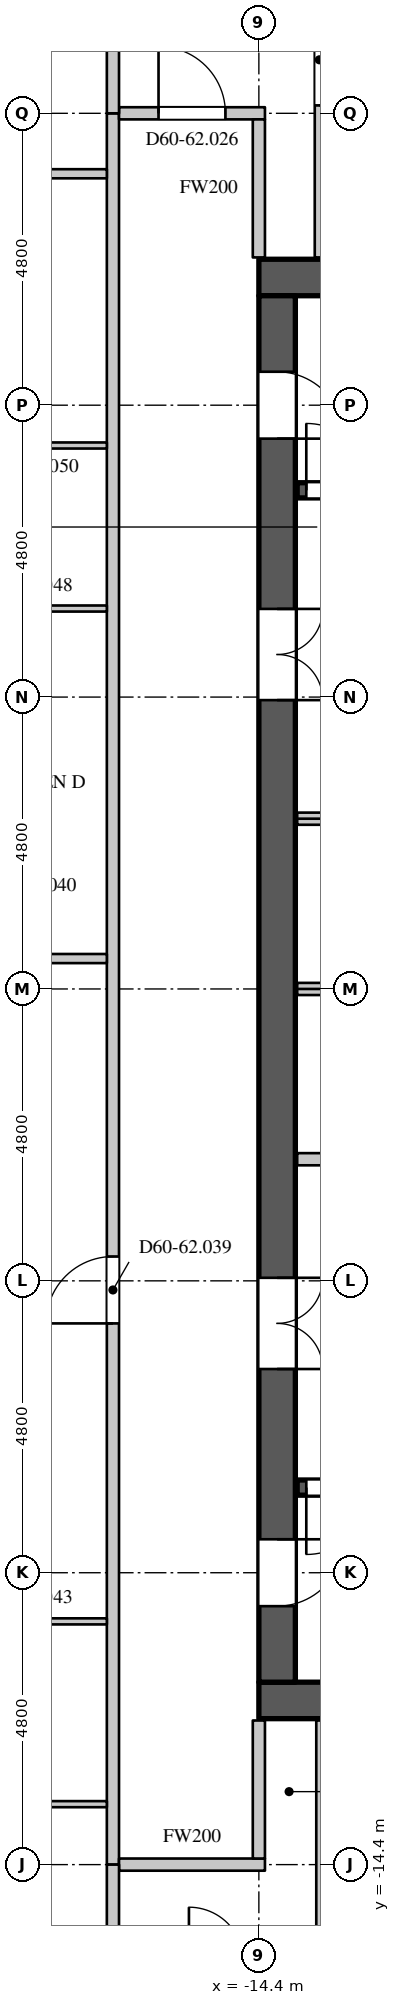
"""IFC4 building model, lengths in metres.
Left out: names, types, materials, properties, quantities, classifications, styles, units other than length and angle.
Written with IfcOpenShell. Run it as: python <this file> out.ifc"""

import sys

from ifc_helpers import new_model, si_unit, direction, frame, frame_2d, origin, place, context, subcontext, project, spatial, rectangle, extrude, element, fill, save


model = new_model("IFC4")
c1 = context("Model", 3, precision=1e-05, world=origin(), true_north=direction((0.0, 1.0)))
c2 = subcontext(c1, "Body", "Model", "MODEL_VIEW")
j1 = project(units=[si_unit("LENGTHUNIT", "METRE"), si_unit("PLANEANGLEUNIT", "RADIAN")], contexts=[c1])
p1 = place(None, origin())
s1 = spatial("IfcSite", under=j1, at=p1, CompositionType="ELEMENT")
p2 = place(p1, origin())
s2 = spatial("IfcBuilding", under=s1, at=p2, CompositionType="ELEMENT")
p3 = place(p2, frame((0.0, 0.0, 260.1)))
s3 = spatial("IfcBuildingStorey", under=s2, at=p3, CompositionType="ELEMENT", Elevation=260.1)
for number, where, z_axis, x_axis in (
    (1, (-14.4, 11.7, 0.0), (0.0, 0.0, 1.0), (1.0, 0.0, 0.0)),
    (2, (-14.4, -11.7, 0.0), (0.0, 0.0, 1.0), (1.0, 0.0, 0.0)),
):
    element("IfcWall", number, at=place(p3, frame(where, z_axis=z_axis, x_axis=x_axis)), inside=s3, PredefinedType="SHEAR", context=c2, shape_type="SweptSolid", body=[
        extrude(rectangle(XDim=28.8, YDim=0.6, at=frame_2d((14.4, 0.0))), origin(), (0.0, 0.0, 1.0), 4.2),
    ])
p4 = place(p3, frame((-14.1, -11.4, 0.0), z_axis=(0.0, 0.0, 1.0), x_axis=(0.0, 1.0, 0.0)))
e3 = element("IfcWall", 3, at=p4, inside=s3, PredefinedType="SHEAR", context=c2, shape_type="SweptSolid", body=[
    extrude(rectangle(XDim=22.8, YDim=0.6, at=frame_2d((11.4, 0.0))), origin(), (0.0, 0.0, 1.0), 4.2),
])
p5 = place(p4, frame((20.45, 0.0, 0.0)))
e4 = element("IfcOpeningElement", 4, at=p5, cuts=e3, PredefinedType="OPENING", context=c2, shape_type="SweptSolid", body=[
    extrude(rectangle(XDim=1.1, YDim=2.2, at=frame_2d((0.55, 1.1))), frame((0.0, 0.31, 0.0), z_axis=(0.0, -1.0, 0.0), x_axis=(1.0, 0.0, 0.0)), (0.0, 0.0, 1.0), 0.62),
])
p6 = place(p4, frame((1.25, 0.0, 0.0)))
e5 = element("IfcOpeningElement", 5, at=p6, cuts=e3, PredefinedType="OPENING", context=c2, shape_type="SweptSolid", body=[
    extrude(rectangle(XDim=1.1, YDim=2.2, at=frame_2d((0.55, 1.1))), frame((0.0, 0.31, 0.0), z_axis=(0.0, -1.0, 0.0), x_axis=(1.0, 0.0, 0.0)), (0.0, 0.0, 1.0), 0.62),
])
p7 = place(p4, frame((16.15, 0.0, 0.0)))
e6 = element("IfcOpeningElement", 6, at=p7, cuts=e3, PredefinedType="OPENING", context=c2, shape_type="SweptSolid", body=[
    extrude(rectangle(XDim=1.5, YDim=2.4, at=frame_2d((0.75, 1.2))), frame((0.0, 0.31, 0.0), z_axis=(0.0, -1.0, 0.0), x_axis=(1.0, 0.0, 0.0)), (0.0, 0.0, 1.0), 0.62),
])
p8 = place(p4, frame((5.15, 0.0, 0.0)))
e7 = element("IfcOpeningElement", 7, at=p8, cuts=e3, PredefinedType="OPENING", context=c2, shape_type="SweptSolid", body=[
    extrude(rectangle(XDim=1.5, YDim=2.4, at=frame_2d((0.75, 1.2))), frame((0.0, 0.31, 0.0), z_axis=(0.0, -1.0, 0.0), x_axis=(1.0, 0.0, 0.0)), (0.0, 0.0, 1.0), 0.62),
])
p9 = place(p3, frame((-16.8, -14.4, 0.0), z_axis=(0.0, 0.0, 1.0), x_axis=(0.0, 1.0, 0.0)))
e8 = element("IfcWall", 8, at=p9, inside=s3, PredefinedType="PARTITIONING", context=c2, shape_type="SweptSolid", body=[
    extrude(rectangle(XDim=28.8, YDim=0.2, at=frame_2d((14.4, 0.0))), origin(), (0.0, 0.0, 1.0), 3.95),
])
p10 = place(p9, frame((8.9, 0.0, 0.0)))
e9 = element("IfcOpeningElement", 9, at=p10, cuts=e8, PredefinedType="OPENING", context=c2, shape_type="SweptSolid", body=[
    extrude(rectangle(XDim=1.1, YDim=2.4, at=frame_2d((0.55, 1.2))), frame((0.0, 0.11, 0.0), z_axis=(0.0, -1.0, 0.0), x_axis=(1.0, 0.0, 0.0)), (0.0, 0.0, 1.0), 0.22),
])
p11 = place(p3, frame((-16.7, -14.4, 0.0), z_axis=(0.0, 0.0, 1.0), x_axis=(1.0, 0.0, 0.0)))
e10 = element("IfcWall", 10, at=p11, inside=s3, PredefinedType="PARTITIONING", context=c2, shape_type="SweptSolid", body=[
    extrude(rectangle(XDim=2.4, YDim=0.2, at=frame_2d((1.2, 0.0))), origin(), (0.0, 0.0, 1.0), 3.95),
])
p12 = place(p3, frame((-16.7, 14.4, 0.0), z_axis=(0.0, 0.0, 1.0), x_axis=(1.0, 0.0, 0.0)))
e11 = element("IfcWall", 11, at=p12, inside=s3, PredefinedType="PARTITIONING", context=c2, shape_type="SweptSolid", body=[
    extrude(rectangle(XDim=2.4, YDim=0.2, at=frame_2d((1.2, 0.0))), origin(), (0.0, 0.0, 1.0), 3.95),
])
p13 = place(p12, frame((0.65, 0.0, 0.0)))
e12 = element("IfcOpeningElement", 12, at=p13, cuts=e11, PredefinedType="OPENING", context=c2, shape_type="SweptSolid", body=[
    extrude(rectangle(XDim=1.1, YDim=2.4, at=frame_2d((0.55, 1.2))), frame((0.0, 0.11, 0.0), z_axis=(0.0, -1.0, 0.0), x_axis=(1.0, 0.0, 0.0)), (0.0, 0.0, 1.0), 0.22),
])
for number, where, z_axis, x_axis in (
    (13, (-14.4, -14.3, 0.0), (0.0, 0.0, 1.0), (0.0, 1.0, 0.0)),
    (14, (-14.4, 12.03, 0.0), (0.0, 0.0, 1.0), (0.0, 1.0, 0.0)),
):
    element("IfcWall", number, at=place(p3, frame(where, z_axis=z_axis, x_axis=x_axis)), inside=s3, PredefinedType="PARTITIONING", context=c2, shape_type="SweptSolid", body=[
        extrude(rectangle(XDim=2.27, YDim=0.2, at=frame_2d((1.135, 0.0))), origin(), (0.0, 0.0, 1.0), 3.95),
    ])
p14 = place(p3, frame((-25.224, 13.406, 0.0), z_axis=(0.0, 0.0, 1.0), x_axis=(1.0, 0.0, 0.0)))
e15 = element("IfcWall", 15, at=p14, inside=s3, PredefinedType="PARTITIONING", context=c2, shape_type="SweptSolid", body=[
    extrude(rectangle(XDim=8.324, YDim=0.15, at=frame_2d((4.162, 0.0))), origin(), (0.0, 0.0, 1.0), 3.95),
])
p15 = place(p14, frame((1.693, 0.0, 0.0)))
e16 = element("IfcOpeningElement", 16, at=p15, cuts=e15, PredefinedType="OPENING", context=c2, shape_type="SweptSolid", body=[
    extrude(rectangle(XDim=1.5, YDim=2.2, at=frame_2d((0.75, 1.1))), frame((0.0, 0.085, 0.0), z_axis=(0.0, -1.0, 0.0), x_axis=(1.0, 0.0, 0.0)), (0.0, 0.0, 1.0), 0.17),
])
p16 = place(p3, frame((-20.825, 0.5, 0.0), z_axis=(0.0, 0.0, 1.0), x_axis=(1.0, 0.0, 0.0)))
e17 = element("IfcWall", 17, at=p16, inside=s3, PredefinedType="PARTITIONING", context=c2, shape_type="SweptSolid", body=[
    extrude(rectangle(XDim=3.925, YDim=0.15, at=frame_2d((1.962, 0.0))), origin(), (0.0, 0.0, 1.0), 3.95),
])
p17 = place(p16, frame((1.5, 0.0, 0.0)))
e18 = element("IfcOpeningElement", 18, at=p17, cuts=e17, PredefinedType="OPENING", context=c2, shape_type="SweptSolid", body=[
    extrude(rectangle(XDim=0.95, YDim=2.2, at=frame_2d((0.475, 1.1))), frame((0.0, 0.085, 0.0), z_axis=(0.0, -1.0, 0.0), x_axis=(1.0, 0.0, 0.0)), (0.0, 0.0, 1.0), 0.17),
])
p18 = place(p3, frame((-13.406, 12.03, 0.0), z_axis=(0.0, 0.0, 1.0), x_axis=(0.0, 1.0, 0.0)))
e19 = element("IfcWall", 19, at=p18, inside=s3, PredefinedType="PARTITIONING", context=c2, shape_type="SweptSolid", body=[
    extrude(rectangle(XDim=13.701, YDim=0.15, at=frame_2d((6.851, 0.0))), origin(), (0.0, 0.0, 1.0), 3.3),
])
p19 = place(p18, frame((2.5, 0.0, 0.0)))
e20 = element("IfcOpeningElement", 20, at=p19, cuts=e19, PredefinedType="OPENING", context=c2, shape_type="SweptSolid", body=[
    extrude(rectangle(XDim=1.5, YDim=2.2, at=frame_2d((0.75, 1.1))), frame((0.0, 0.085, 0.0), z_axis=(0.0, -1.0, 0.0), x_axis=(1.0, 0.0, 0.0)), (0.0, 0.0, 1.0), 0.17),
])
for number, where, z_axis, x_axis in (
    (21, (-16.8, -19.803, 0.0), (0.0, 0.0, 1.0), (0.0, 1.0, 0.0)),
    (22, (-16.8, 14.4, 0.0), (0.0, 0.0, 1.0), (0.0, 1.0, 0.0)),
):
    element("IfcWall", number, at=place(p3, frame(where, z_axis=z_axis, x_axis=x_axis)), inside=s3, PredefinedType="PARTITIONING", context=c2, shape_type="SweptSolid", body=[
        extrude(rectangle(XDim=5.403, YDim=0.2, at=frame_2d((2.702, 0.0))), origin(), (0.0, 0.0, 1.0), 3.95),
    ])
p20 = place(p3, frame((-13.77, -2.8, 0.0), z_axis=(0.0, 0.0, 1.0), x_axis=(1.0, 0.0, 0.0)))
e23 = element("IfcWall", 23, at=p20, inside=s3, PredefinedType="PARTITIONING", context=c2, shape_type="SweptSolid", body=[
    extrude(rectangle(XDim=3.37, YDim=0.2, at=frame_2d((1.685, 0.0))), origin(), (0.0, 0.0, 1.0), 3.95),
])
p21 = place(p20, frame((1.35, 0.0, 0.0)))
e24 = element("IfcOpeningElement", 24, at=p21, cuts=e23, PredefinedType="OPENING", context=c2, shape_type="SweptSolid", body=[
    extrude(rectangle(XDim=0.6, YDim=2.0, at=frame_2d((0.3, 1.0))), frame((0.0, 0.11, 0.0), z_axis=(0.0, -1.0, 0.0), x_axis=(1.0, 0.0, 0.0)), (0.0, 0.0, 1.0), 0.22),
])
p22 = place(p3, frame((-13.77, 0.0, 0.0), z_axis=(0.0, 0.0, 1.0), x_axis=(1.0, 0.0, 0.0)))
e25 = element("IfcWall", 25, at=p22, inside=s3, PredefinedType="PARTITIONING", context=c2, shape_type="SweptSolid", body=[
    extrude(rectangle(XDim=21.57, YDim=0.2, at=frame_2d((10.785, 0.0))), origin(), (0.0, 0.0, 1.0), 3.95),
])
p23 = place(p3, frame((-13.77, 2.8, 0.0), z_axis=(0.0, 0.0, 1.0), x_axis=(1.0, 0.0, 0.0)))
e26 = element("IfcWall", 26, at=p23, inside=s3, PredefinedType="PARTITIONING", context=c2, shape_type="SweptSolid", body=[
    extrude(rectangle(XDim=5.95, YDim=0.2, at=frame_2d((2.975, 0.0))), origin(), (0.0, 0.0, 1.0), 3.95),
])
p24 = place(p23, frame((1.1, 0.0, 0.0)))
e27 = element("IfcOpeningElement", 27, at=p24, cuts=e26, PredefinedType="OPENING", context=c2, shape_type="SweptSolid", body=[
    extrude(rectangle(XDim=1.1, YDim=2.2, at=frame_2d((0.55, 1.1))), frame((0.0, 0.11, 0.0), z_axis=(0.0, -1.0, 0.0), x_axis=(1.0, 0.0, 0.0)), (0.0, 0.0, 1.0), 0.22),
])
p25 = place(p23, frame((4.1, 0.0, 0.0)))
e28 = element("IfcOpeningElement", 28, at=p25, cuts=e26, PredefinedType="OPENING", context=c2, shape_type="SweptSolid", body=[
    extrude(rectangle(XDim=1.1, YDim=2.2, at=frame_2d((0.55, 1.1))), frame((0.0, 0.11, 0.0), z_axis=(0.0, -1.0, 0.0), x_axis=(1.0, 0.0, 0.0)), (0.0, 0.0, 1.0), 0.22),
])
p26 = place(p3, frame((-13.77, -8.2, 0.0), z_axis=(0.0, 0.0, 1.0), x_axis=(1.0, 0.0, 0.0)))
e29 = element("IfcWall", 29, at=p26, inside=s3, PredefinedType="SHEAR", context=c2, shape_type="SweptSolid", body=[
    extrude(rectangle(XDim=8.495, YDim=0.25, at=frame_2d((4.248, 0.0))), origin(), (0.0, 0.0, 1.0), 3.95),
])
p27 = place(p26, frame((0.15, 0.0, 0.0)))
e30 = element("IfcOpeningElement", 30, at=p27, cuts=e29, PredefinedType="OPENING", context=c2, shape_type="SweptSolid", body=[
    extrude(rectangle(XDim=1.1, YDim=2.2, at=frame_2d((0.55, 1.1))), frame((0.0, 0.135, 0.0), z_axis=(0.0, -1.0, 0.0), x_axis=(1.0, 0.0, 0.0)), (0.0, 0.0, 1.0), 0.27),
])
p28 = place(p3, frame((-13.77, 8.2, 0.0), z_axis=(0.0, 0.0, 1.0), x_axis=(1.0, 0.0, 0.0)))
e31 = element("IfcWall", 31, at=p28, inside=s3, PredefinedType="SHEAR", context=c2, shape_type="SweptSolid", body=[
    extrude(rectangle(XDim=8.495, YDim=0.25, at=frame_2d((4.248, 0.0))), origin(), (0.0, 0.0, 1.0), 3.95),
])
p29 = place(p28, frame((0.15, 0.0, 0.0)))
e32 = element("IfcOpeningElement", 32, at=p29, cuts=e31, PredefinedType="OPENING", context=c2, shape_type="SweptSolid", body=[
    extrude(rectangle(XDim=1.1, YDim=2.2, at=frame_2d((0.55, 1.1))), frame((0.0, 0.135, 0.0), z_axis=(0.0, -1.0, 0.0), x_axis=(1.0, 0.0, 0.0)), (0.0, 0.0, 1.0), 0.27),
])
p30 = place(p3, frame((-20.9, -13.406, 0.0), z_axis=(0.0, 0.0, 1.0), x_axis=(1.0, 0.0, 0.0)))
e33 = element("IfcWall", 33, at=p30, inside=s3, PredefinedType="PARTITIONING", context=c2, shape_type="SweptSolid", body=[
    extrude(rectangle(XDim=4.0, YDim=0.1, at=frame_2d((2.0, 0.0))), origin(), (0.0, 0.0, 1.0), 3.95),
])
p31 = place(p3, frame((-20.825, -10.4, 0.0), z_axis=(0.0, 0.0, 1.0), x_axis=(1.0, 0.0, 0.0)))
e34 = element("IfcWall", 34, at=p31, inside=s3, PredefinedType="PARTITIONING", context=c2, shape_type="SweptSolid", body=[
    extrude(rectangle(XDim=3.925, YDim=0.1, at=frame_2d((1.962, 0.0))), origin(), (0.0, 0.0, 1.0), 3.95),
])
p32 = place(p31, frame((1.5, 0.0, 0.0)))
e35 = element("IfcOpeningElement", 35, at=p32, cuts=e34, PredefinedType="OPENING", context=c2, shape_type="SweptSolid", body=[
    extrude(rectangle(XDim=0.9, YDim=2.2, at=frame_2d((0.45, 1.1))), frame((0.0, 0.06, 0.0), z_axis=(0.0, -1.0, 0.0), x_axis=(1.0, 0.0, 0.0)), (0.0, 0.0, 1.0), 0.12),
])
p33 = place(p3, frame((-20.825, 6.256, 0.0), z_axis=(0.0, 0.0, 1.0), x_axis=(1.0, 0.0, 0.0)))
e36 = element("IfcWall", 36, at=p33, inside=s3, PredefinedType="PARTITIONING", context=c2, shape_type="SweptSolid", body=[
    extrude(rectangle(XDim=3.925, YDim=0.1, at=frame_2d((1.962, 0.0))), origin(), (0.0, 0.0, 1.0), 3.95),
])
p34 = place(p33, frame((1.5, 0.0, 0.0)))
e37 = element("IfcOpeningElement", 37, at=p34, cuts=e36, PredefinedType="OPENING", context=c2, shape_type="SweptSolid", body=[
    extrude(rectangle(XDim=0.9, YDim=2.2, at=frame_2d((0.45, 1.1))), frame((0.0, 0.06, 0.0), z_axis=(0.0, -1.0, 0.0), x_axis=(1.0, 0.0, 0.0)), (0.0, 0.0, 1.0), 0.12),
])
p35 = place(p3, frame((-20.88, 8.937, 0.0), z_axis=(0.0, 0.0, 1.0), x_axis=(1.0, 0.0, 0.0)))
e38 = element("IfcWall", 38, at=p35, inside=s3, PredefinedType="PARTITIONING", context=c2, shape_type="SweptSolid", body=[
    extrude(rectangle(XDim=3.98, YDim=0.1, at=frame_2d((1.99, 0.0))), origin(), (0.0, 0.0, 1.0), 3.95),
])
p36 = place(p35, frame((1.95, 0.0, 0.0)))
e39 = element("IfcOpeningElement", 39, at=p36, cuts=e38, PredefinedType="OPENING", context=c2, shape_type="SweptSolid", body=[
    extrude(rectangle(XDim=0.9, YDim=2.2, at=frame_2d((0.45, 1.1))), frame((0.0, 0.06, 0.0), z_axis=(0.0, -1.0, 0.0), x_axis=(1.0, 0.0, 0.0)), (0.0, 0.0, 1.0), 0.12),
])
p37 = place(p3, frame((-13.406, -16.0, 0.0), z_axis=(0.0, 0.0, 1.0), x_axis=(0.0, 1.0, 0.0)))
e40 = element("IfcWall", 40, at=p37, inside=s3, PredefinedType="PARTITIONING", context=c2, shape_type="SweptSolid", body=[
    extrude(rectangle(XDim=3.97, YDim=0.1, at=frame_2d((1.985, 0.0))), origin(), (0.0, 0.0, 1.0), 3.3),
])
p38 = place(p29, origin())
e41 = element("IfcDoor", 41, at=p38, inside=s3, OperationType="SINGLE_SWING_LEFT", PredefinedType="DOOR", context=c2, shape_type="SweptSolid", body=[
    extrude(rectangle(XDim=1.1, YDim=2.2, at=frame_2d((0.55, 1.1))), frame((0.0, 0.025, 0.0), z_axis=(0.0, -1.0, 0.0), x_axis=(1.0, 0.0, 0.0)), (0.0, 0.0, 1.0), 0.05),
])
fill(e32, e41)
p39 = place(p27, origin())
e42 = element("IfcDoor", 42, at=p39, inside=s3, OperationType="SINGLE_SWING_RIGHT", PredefinedType="DOOR", context=c2, shape_type="SweptSolid", body=[
    extrude(rectangle(XDim=1.1, YDim=2.2, at=frame_2d((0.55, 1.1))), frame((0.0, 0.025, 0.0), z_axis=(0.0, -1.0, 0.0), x_axis=(1.0, 0.0, 0.0)), (0.0, 0.0, 1.0), 0.05),
])
fill(e30, e42)
p40 = place(p5, origin())
e43 = element("IfcDoor", 43, at=p40, inside=s3, OperationType="SINGLE_SWING_RIGHT", PredefinedType="DOOR", context=c2, shape_type="SweptSolid", body=[
    extrude(rectangle(XDim=1.1, YDim=2.2, at=frame_2d((0.55, 1.1))), frame((0.0, -0.245, 0.0), z_axis=(0.0, -1.0, 0.0), x_axis=(1.0, 0.0, 0.0)), (0.0, 0.0, 1.0), 0.05),
])
fill(e4, e43)
p41 = place(p6, origin())
e44 = element("IfcDoor", 44, at=p41, inside=s3, OperationType="SINGLE_SWING_LEFT", PredefinedType="DOOR", context=c2, shape_type="SweptSolid", body=[
    extrude(rectangle(XDim=1.1, YDim=2.2, at=frame_2d((0.55, 1.1))), frame((0.0, -0.245, 0.0), z_axis=(0.0, -1.0, 0.0), x_axis=(1.0, 0.0, 0.0)), (0.0, 0.0, 1.0), 0.05),
])
fill(e5, e44)
p42 = place(p7, origin())
e45 = element("IfcDoor", 45, at=p42, inside=s3, OperationType="DOUBLE_DOOR_SINGLE_SWING", PredefinedType="DOOR", context=c2, shape_type="SweptSolid", body=[
    extrude(rectangle(XDim=1.5, YDim=2.4, at=frame_2d((0.75, 1.2))), frame((0.0, -0.245, 0.0), z_axis=(0.0, -1.0, 0.0), x_axis=(1.0, 0.0, 0.0)), (0.0, 0.0, 1.0), 0.05),
])
fill(e6, e45)
p43 = place(p8, origin())
e46 = element("IfcDoor", 46, at=p43, inside=s3, OperationType="DOUBLE_DOOR_SINGLE_SWING", PredefinedType="DOOR", context=c2, shape_type="SweptSolid", body=[
    extrude(rectangle(XDim=1.5, YDim=2.4, at=frame_2d((0.75, 1.2))), frame((0.0, -0.245, 0.0), z_axis=(0.0, -1.0, 0.0), x_axis=(1.0, 0.0, 0.0)), (0.0, 0.0, 1.0), 0.05),
])
fill(e7, e46)
p44 = place(p13, origin())
e47 = element("IfcDoor", 47, at=p44, inside=s3, OperationType="SINGLE_SWING_LEFT", PredefinedType="DOOR", context=c2, shape_type="SweptSolid", body=[
    extrude(rectangle(XDim=1.1, YDim=2.4, at=frame_2d((0.55, 1.2))), frame((0.0, 0.025, 0.0), z_axis=(0.0, -1.0, 0.0), x_axis=(1.0, 0.0, 0.0)), (0.0, 0.0, 1.0), 0.05),
])
fill(e12, e47)
p45 = place(p19, origin())
e48 = element("IfcDoor", 48, at=p45, inside=s3, OperationType="DOUBLE_DOOR_SINGLE_SWING", PredefinedType="DOOR", context=c2, shape_type="SweptSolid", body=[
    extrude(rectangle(XDim=1.5, YDim=2.2, at=frame_2d((0.75, 1.1))), frame((0.0, 0.025, 0.0), z_axis=(0.0, -1.0, 0.0), x_axis=(1.0, 0.0, 0.0)), (0.0, 0.0, 1.0), 0.05),
])
fill(e20, e48)
p46 = place(p10, origin())
e49 = element("IfcDoor", 49, at=p46, inside=s3, OperationType="SINGLE_SWING_LEFT", PredefinedType="DOOR", context=c2, shape_type="SweptSolid", body=[
    extrude(rectangle(XDim=1.1, YDim=2.4, at=frame_2d((0.55, 1.2))), frame((0.0, 0.025, 0.0), z_axis=(0.0, -1.0, 0.0), x_axis=(1.0, 0.0, 0.0)), (0.0, 0.0, 1.0), 0.05),
])
fill(e9, e49)
save(model, sys.argv[1])
